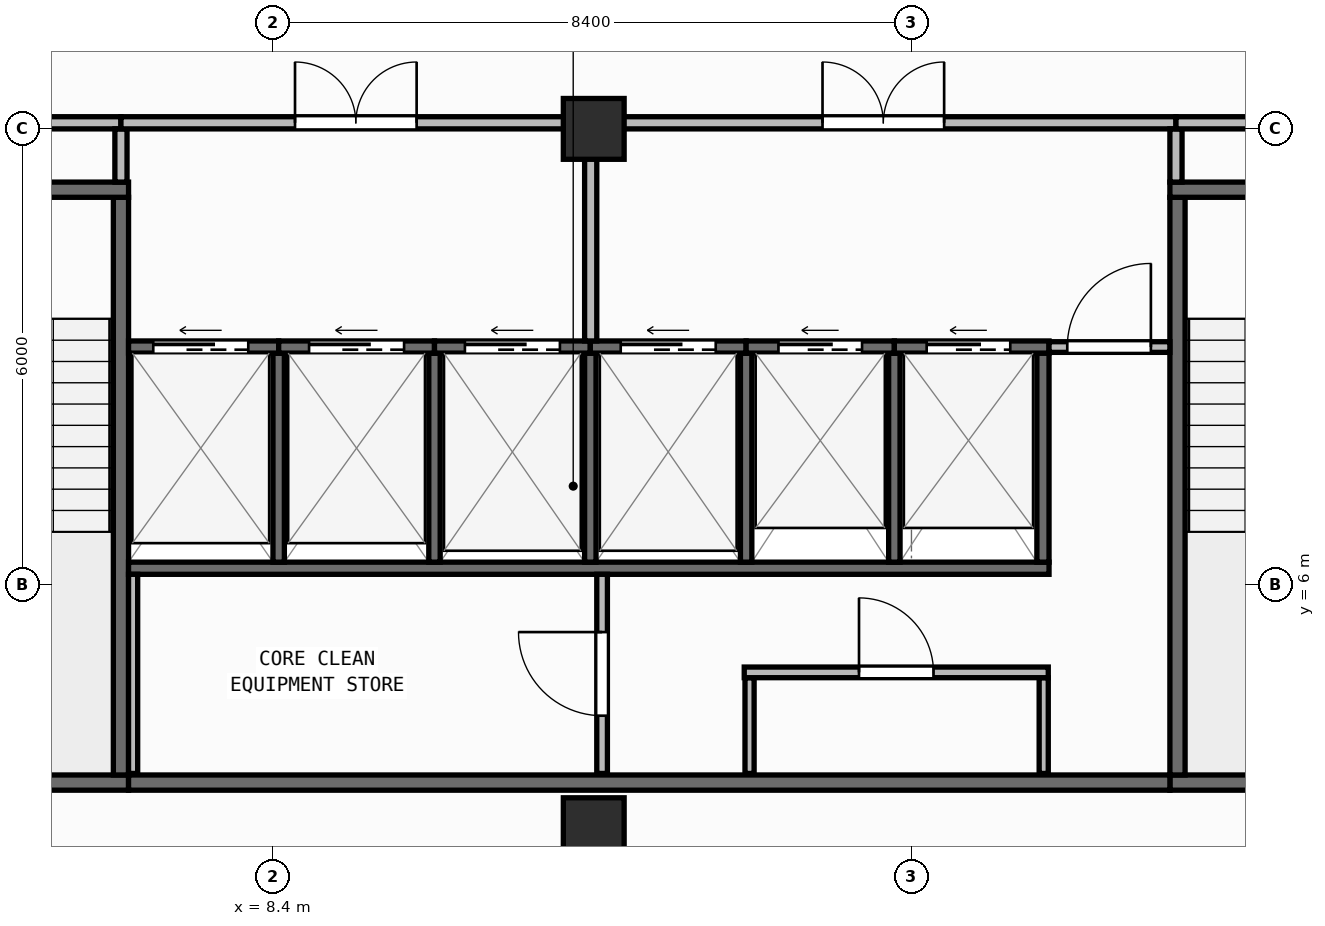
"""IFC4 building model, lengths in metres.
Left out: names, types, materials, properties, quantities, classifications, styles, units other than length and angle.
Written with IfcOpenShell. Run it as: python <this file> out.ifc"""

import sys

from ifc_helpers import new_model, si_unit, direction, frame, frame_2d, origin, origin_2d, place, context, subcontext, project, spatial, rectangle, extrude, element, fill, save


model = new_model("IFC4")
c1 = context("Model", 3, precision=1e-05, world=origin(), true_north=direction((0.0, 1.0)))
c2 = subcontext(c1, "Body", "Model", "MODEL_VIEW")
j1 = project(units=[si_unit("LENGTHUNIT", "METRE"), si_unit("PLANEANGLEUNIT", "RADIAN")], contexts=[c1])
p1 = place(None, origin())
s1 = spatial("IfcSite", under=j1, at=p1, CompositionType="ELEMENT")
p2 = place(p1, origin())
s2 = spatial("IfcBuilding", under=s1, at=p2, CompositionType="ELEMENT")
p3 = place(p2, frame((0.0, 0.0, 244.7)))
s3 = spatial("IfcBuildingStorey", under=s2, at=p3, CompositionType="ELEMENT", Elevation=244.7)
for number, where, z_axis, x_axis in (
    (1, (12.62, 2.8, 0.0), (0.0, 0.0, 1.0), (1.0, 0.0, 0.0)),
    (2, (12.62, 12.0, 0.0), (0.0, 0.0, 1.0), (1.0, 0.0, 0.0)),
):
    element("IfcColumn", number, at=place(p3, frame(where, z_axis=z_axis, x_axis=x_axis)), inside=s3, PredefinedType="COLUMN", context=c2, shape_type="SweptSolid", body=[
        extrude(rectangle(XDim=0.8, YDim=0.8, at=origin_2d()), origin(), (0.0, 0.0, 1.0), 3.95),
    ])
p4 = place(p3, frame((2.66, 0.174, 0.0), z_axis=(0.0, 0.0, 1.0), x_axis=(0.996611813627, 0.082248969229, 0.0)))
e3 = element("IfcWall", 3, at=p4, inside=s3, PredefinedType="STANDARD", context=c2, shape_type="SweptSolid", body=[
    extrude(rectangle(XDim=41.019, YDim=0.26, at=frame_2d((20.51, 0.0))), origin(), (0.0, 0.0, 1.0), 3.71),
])
p5 = place(p4, frame((19.31, 0.0, 0.9)))
e4 = element("IfcOpeningElement", 4, at=p5, cuts=e3, PredefinedType="OPENING", context=c2, shape_type="SweptSolid", body=[
    extrude(rectangle(XDim=2.4, YDim=1.65, at=frame_2d((1.2, 0.825))), frame((0.0, 0.14, 0.0), z_axis=(0.0, -1.0, 0.0), x_axis=(1.0, 0.0, 0.0)), (0.0, 0.0, 1.0), 0.28),
])
p6 = place(p3, frame((2.8, 3.4, 0.0), z_axis=(0.0, 0.0, 1.0), x_axis=(1.0, 0.0, 0.0)))
e5 = element("IfcWall", 5, at=p6, inside=s3, PredefinedType="SHEAR", context=c2, shape_type="SweptSolid", body=[
    extrude(rectangle(XDim=3.7, YDim=0.2, at=frame_2d((1.85, 0.0))), origin(), (0.0, 0.0, 1.0), 3.71),
])
p7 = place(p3, frame((6.4, 3.5, 0.0), z_axis=(0.0, 0.0, 1.0), x_axis=(0.0, 1.0, 0.0)))
e6 = element("IfcWall", 6, at=p7, inside=s3, PredefinedType="SHEAR", context=c2, shape_type="SweptSolid", body=[
    extrude(rectangle(XDim=7.6, YDim=0.2, at=frame_2d((3.8, 0.0))), origin(), (0.0, 0.0, 1.0), 3.71),
])
p8 = place(p3, frame((2.8, 11.2, 0.0), z_axis=(0.0, 0.0, 1.0), x_axis=(1.0, 0.0, 0.0)))
e7 = element("IfcWall", 7, at=p8, inside=s3, PredefinedType="SHEAR", context=c2, shape_type="SweptSolid", body=[
    extrude(rectangle(XDim=3.7, YDim=0.2, at=frame_2d((1.85, 0.0))), origin(), (0.0, 0.0, 1.0), 3.71),
])
p9 = place(p8, frame((1.2, 0.0, 0.0)))
e8 = element("IfcOpeningElement", 8, at=p9, cuts=e7, PredefinedType="OPENING", context=c2, shape_type="SweptSolid", body=[
    extrude(rectangle(XDim=1.3, YDim=2.15, at=frame_2d((0.65, 1.075))), frame((0.0, 0.11, 0.0), z_axis=(0.0, -1.0, 0.0), x_axis=(1.0, 0.0, 0.0)), (0.0, 0.0, 1.0), 0.22),
])
p10 = place(p3, frame((20.2, 3.4, 0.0), z_axis=(0.0, 0.0, 1.0), x_axis=(1.0, 0.0, 0.0)))
e9 = element("IfcWall", 9, at=p10, inside=s3, PredefinedType="SHEAR", context=c2, shape_type="SweptSolid", body=[
    extrude(rectangle(XDim=3.7, YDim=0.2, at=frame_2d((1.85, 0.0))), origin(), (0.0, 0.0, 1.0), 3.71),
])
p11 = place(p3, frame((20.3, 3.5, 0.0), z_axis=(0.0, 0.0, 1.0), x_axis=(0.0, 1.0, 0.0)))
e10 = element("IfcWall", 10, at=p11, inside=s3, PredefinedType="SHEAR", context=c2, shape_type="SweptSolid", body=[
    extrude(rectangle(XDim=7.6, YDim=0.2, at=frame_2d((3.8, 0.0))), origin(), (0.0, 0.0, 1.0), 3.71),
])
p12 = place(p3, frame((20.2, 11.2, 0.0), z_axis=(0.0, 0.0, 1.0), x_axis=(1.0, 0.0, 0.0)))
e11 = element("IfcWall", 11, at=p12, inside=s3, PredefinedType="SHEAR", context=c2, shape_type="SweptSolid", body=[
    extrude(rectangle(XDim=3.7, YDim=0.2, at=frame_2d((1.85, 0.0))), origin(), (0.0, 0.0, 1.0), 3.71),
])
p13 = place(p12, frame((1.2, 0.0, 0.0)))
e12 = element("IfcOpeningElement", 12, at=p13, cuts=e11, PredefinedType="OPENING", context=c2, shape_type="SweptSolid", body=[
    extrude(rectangle(XDim=1.3, YDim=2.15, at=frame_2d((0.65, 1.075))), frame((0.0, 0.11, 0.0), z_axis=(0.0, -1.0, 0.0), x_axis=(1.0, 0.0, 0.0)), (0.0, 0.0, 1.0), 0.22),
])
p14 = place(p3, frame((6.5, 3.4, 0.0), z_axis=(0.0, 0.0, 1.0), x_axis=(1.0, 0.0, 0.0)))
e13 = element("IfcWall", 13, at=p14, inside=s3, PredefinedType="SHEAR", context=c2, shape_type="SweptSolid", body=[
    extrude(rectangle(XDim=13.7, YDim=0.2, at=frame_2d((6.85, 0.0))), origin(), (0.0, 0.0, 1.0), 3.71),
])
p15 = place(p3, frame((6.5, 6.22, 0.0), z_axis=(0.0, 0.0, 1.0), x_axis=(1.0, 0.0, 0.0)))
e14 = element("IfcWall", 14, at=p15, inside=s3, PredefinedType="SHEAR", context=c2, shape_type="SweptSolid", body=[
    extrude(rectangle(XDim=12.11, YDim=0.16, at=frame_2d((6.055, 0.0))), origin(), (0.0, 0.0, 1.0), 3.71),
])
p16 = place(p3, frame((18.53, 6.3, 0.0), z_axis=(0.0, 0.0, 1.0), x_axis=(0.0, 1.0, 0.0)))
e15 = element("IfcWall", 15, at=p16, inside=s3, PredefinedType="SHEAR", context=c2, shape_type="SweptSolid", body=[
    extrude(rectangle(XDim=2.75, YDim=0.16, at=frame_2d((1.375, 0.0))), origin(), (0.0, 0.0, 1.0), 3.71),
])
for number, where, z_axis, x_axis in (
    (16, (8.475, 6.3, 0.0), (0.0, 0.0, 1.0), (0.0, 1.0, 0.0)),
    (17, (10.525, 6.3, 0.0), (0.0, 0.0, 1.0), (0.0, 1.0, 0.0)),
    (18, (12.575, 6.3, 0.0), (0.0, 0.0, 1.0), (0.0, 1.0, 0.0)),
    (19, (14.625, 6.3, 0.0), (0.0, 0.0, 1.0), (0.0, 1.0, 0.0)),
    (20, (16.575, 6.3, 0.0), (0.0, 0.0, 1.0), (0.0, 1.0, 0.0)),
):
    element("IfcWall", number, at=place(p3, frame(where, z_axis=z_axis, x_axis=x_axis)), inside=s3, PredefinedType="SHEAR", context=c2, shape_type="SweptSolid", body=[
        extrude(rectangle(XDim=2.75, YDim=0.15, at=frame_2d((1.375, 0.0))), origin(), (0.0, 0.0, 1.0), 3.71),
    ])
p17 = place(p3, frame((6.5, 9.13, 0.0), z_axis=(0.0, 0.0, 1.0), x_axis=(1.0, 0.0, 0.0)))
e21 = element("IfcWall", 21, at=p17, inside=s3, PredefinedType="SHEAR", context=c2, shape_type="SweptSolid", body=[
    extrude(rectangle(XDim=1.975, YDim=0.16, at=frame_2d((0.988, 0.0))), origin(), (0.0, 0.0, 1.0), 3.71),
])
p18 = place(p17, frame((0.325, 0.0, 0.0)))
e22 = element("IfcOpeningElement", 22, at=p18, cuts=e21, PredefinedType="OPENING", context=c2, shape_type="SweptSolid", body=[
    extrude(rectangle(XDim=1.25, YDim=2.15, at=frame_2d((0.625, 1.075))), frame((0.0, 0.09, 0.0), z_axis=(0.0, -1.0, 0.0), x_axis=(1.0, 0.0, 0.0)), (0.0, 0.0, 1.0), 0.18),
])
p19 = place(p3, frame((8.475, 9.13, 0.0), z_axis=(0.0, 0.0, 1.0), x_axis=(1.0, 0.0, 0.0)))
e23 = element("IfcWall", 23, at=p19, inside=s3, PredefinedType="SHEAR", context=c2, shape_type="SweptSolid", body=[
    extrude(rectangle(XDim=2.05, YDim=0.16, at=frame_2d((1.025, 0.0))), origin(), (0.0, 0.0, 1.0), 3.71),
])
p20 = place(p19, frame((0.4, 0.0, 0.0)))
e24 = element("IfcOpeningElement", 24, at=p20, cuts=e23, PredefinedType="OPENING", context=c2, shape_type="SweptSolid", body=[
    extrude(rectangle(XDim=1.25, YDim=2.15, at=frame_2d((0.625, 1.075))), frame((0.0, 0.09, 0.0), z_axis=(0.0, -1.0, 0.0), x_axis=(1.0, 0.0, 0.0)), (0.0, 0.0, 1.0), 0.18),
])
p21 = place(p3, frame((10.525, 9.13, 0.0), z_axis=(0.0, 0.0, 1.0), x_axis=(1.0, 0.0, 0.0)))
e25 = element("IfcWall", 25, at=p21, inside=s3, PredefinedType="SHEAR", context=c2, shape_type="SweptSolid", body=[
    extrude(rectangle(XDim=2.05, YDim=0.16, at=frame_2d((1.025, 0.0))), origin(), (0.0, 0.0, 1.0), 3.71),
])
p22 = place(p21, frame((0.4, 0.0, 0.0)))
e26 = element("IfcOpeningElement", 26, at=p22, cuts=e25, PredefinedType="OPENING", context=c2, shape_type="SweptSolid", body=[
    extrude(rectangle(XDim=1.25, YDim=2.15, at=frame_2d((0.625, 1.075))), frame((0.0, 0.09, 0.0), z_axis=(0.0, -1.0, 0.0), x_axis=(1.0, 0.0, 0.0)), (0.0, 0.0, 1.0), 0.18),
])
p23 = place(p3, frame((12.575, 9.13, 0.0), z_axis=(0.0, 0.0, 1.0), x_axis=(1.0, 0.0, 0.0)))
e27 = element("IfcWall", 27, at=p23, inside=s3, PredefinedType="SHEAR", context=c2, shape_type="SweptSolid", body=[
    extrude(rectangle(XDim=2.05, YDim=0.16, at=frame_2d((1.025, 0.0))), origin(), (0.0, 0.0, 1.0), 3.71),
])
p24 = place(p23, frame((0.4, 0.0, 0.0)))
e28 = element("IfcOpeningElement", 28, at=p24, cuts=e27, PredefinedType="OPENING", context=c2, shape_type="SweptSolid", body=[
    extrude(rectangle(XDim=1.25, YDim=2.15, at=frame_2d((0.625, 1.075))), frame((0.0, 0.09, 0.0), z_axis=(0.0, -1.0, 0.0), x_axis=(1.0, 0.0, 0.0)), (0.0, 0.0, 1.0), 0.18),
])
p25 = place(p3, frame((14.625, 9.13, 0.0), z_axis=(0.0, 0.0, 1.0), x_axis=(1.0, 0.0, 0.0)))
e29 = element("IfcWall", 29, at=p25, inside=s3, PredefinedType="SHEAR", context=c2, shape_type="SweptSolid", body=[
    extrude(rectangle(XDim=1.95, YDim=0.16, at=frame_2d((0.975, 0.0))), origin(), (0.0, 0.0, 1.0), 3.71),
])
p26 = place(p25, frame((0.425, 0.0, 0.0)))
e30 = element("IfcOpeningElement", 30, at=p26, cuts=e29, PredefinedType="OPENING", context=c2, shape_type="SweptSolid", body=[
    extrude(rectangle(XDim=1.1, YDim=2.15, at=frame_2d((0.55, 1.075))), frame((0.0, 0.09, 0.0), z_axis=(0.0, -1.0, 0.0), x_axis=(1.0, 0.0, 0.0)), (0.0, 0.0, 1.0), 0.18),
])
p27 = place(p3, frame((16.575, 9.13, 0.0), z_axis=(0.0, 0.0, 1.0), x_axis=(1.0, 0.0, 0.0)))
e31 = element("IfcWall", 31, at=p27, inside=s3, PredefinedType="SHEAR", context=c2, shape_type="SweptSolid", body=[
    extrude(rectangle(XDim=2.035, YDim=0.16, at=frame_2d((1.018, 0.0))), origin(), (0.0, 0.0, 1.0), 3.71),
])
p28 = place(p27, frame((0.425, 0.0, 0.0)))
e32 = element("IfcOpeningElement", 32, at=p28, cuts=e31, PredefinedType="OPENING", context=c2, shape_type="SweptSolid", body=[
    extrude(rectangle(XDim=1.1, YDim=2.15, at=frame_2d((0.55, 1.075))), frame((0.0, 0.09, 0.0), z_axis=(0.0, -1.0, 0.0), x_axis=(1.0, 0.0, 0.0)), (0.0, 0.0, 1.0), 0.18),
])
p29 = place(p3, frame((6.56, 3.52, 0.0), z_axis=(0.0, 0.0, 1.0), x_axis=(0.0, 1.0, 0.0)))
e33 = element("IfcWall", 33, at=p29, inside=s3, PredefinedType="PARTITIONING", context=c2, shape_type="SweptSolid", body=[
    extrude(rectangle(XDim=2.62, YDim=0.12, at=frame_2d((1.31, 0.0))), origin(), (0.0, 0.0, 1.0), 3.71),
])
p30 = place(p3, frame((12.73, 3.52, 0.0), z_axis=(0.0, 0.0, 1.0), x_axis=(0.0, 1.0, 0.0)))
e34 = element("IfcWall", 34, at=p30, inside=s3, PredefinedType="PARTITIONING", context=c2, shape_type="SweptSolid", body=[
    extrude(rectangle(XDim=2.62, YDim=0.14, at=frame_2d((1.31, 0.0))), origin(), (0.0, 0.0, 1.0), 3.71),
])
p31 = place(p30, frame((0.76, 0.0, 0.0)))
e35 = element("IfcOpeningElement", 35, at=p31, cuts=e34, PredefinedType="OPENING", context=c2, shape_type="SweptSolid", body=[
    extrude(rectangle(XDim=1.1, YDim=2.1, at=frame_2d((0.55, 1.05))), frame((0.0, 0.08, 0.0), z_axis=(0.0, -1.0, 0.0), x_axis=(1.0, 0.0, 0.0)), (0.0, 0.0, 1.0), 0.16),
])
for number, where, z_axis, x_axis in (
    (36, (14.67, 3.52, 0.0), (0.0, 0.0, 1.0), (0.0, 1.0, 0.0)),
    (37, (18.54, 3.52, 0.0), (0.0, 0.0, 1.0), (0.0, 1.0, 0.0)),
):
    element("IfcWall", number, at=place(p3, frame(where, z_axis=z_axis, x_axis=x_axis)), inside=s3, PredefinedType="PARTITIONING", context=c2, shape_type="SweptSolid", body=[
        extrude(rectangle(XDim=1.26, YDim=0.12, at=frame_2d((0.63, 0.0))), origin(), (0.0, 0.0, 1.0), 3.71),
    ])
p32 = place(p3, frame((14.6, 4.85, 0.0), z_axis=(0.0, 0.0, 1.0), x_axis=(1.0, 0.0, 0.0)))
e38 = element("IfcWall", 38, at=p32, inside=s3, PredefinedType="PARTITIONING", context=c2, shape_type="SweptSolid", body=[
    extrude(rectangle(XDim=4.0, YDim=0.14, at=frame_2d((2.0, 0.0))), origin(), (0.0, 0.0, 1.0), 3.71),
])
p33 = place(p32, frame((1.51, 0.0, 0.0)))
e39 = element("IfcOpeningElement", 39, at=p33, cuts=e38, PredefinedType="OPENING", context=c2, shape_type="SweptSolid", body=[
    extrude(rectangle(XDim=0.98, YDim=2.1, at=frame_2d((0.49, 1.05))), frame((0.0, 0.08, 0.0), z_axis=(0.0, -1.0, 0.0), x_axis=(1.0, 0.0, 0.0)), (0.0, 0.0, 1.0), 0.16),
])
p34 = place(p3, frame((18.61, 9.13, 0.0), z_axis=(0.0, 0.0, 1.0), x_axis=(1.0, 0.0, 0.0)))
e40 = element("IfcWall", 40, at=p34, inside=s3, PredefinedType="PARTITIONING", context=c2, shape_type="SweptSolid", body=[
    extrude(rectangle(XDim=1.59, YDim=0.14, at=frame_2d((0.795, 0.0))), origin(), (0.0, 0.0, 1.0), 3.71),
])
p35 = place(p34, frame((0.24, 0.0, 0.0)))
e41 = element("IfcOpeningElement", 41, at=p35, cuts=e40, PredefinedType="OPENING", context=c2, shape_type="SweptSolid", body=[
    extrude(rectangle(XDim=1.1, YDim=2.1, at=frame_2d((0.55, 1.05))), frame((0.0, 0.08, 0.0), z_axis=(0.0, -1.0, 0.0), x_axis=(1.0, 0.0, 0.0)), (0.0, 0.0, 1.0), 0.16),
])
p36 = place(p3, frame((2.8, 12.08, 0.0), z_axis=(0.0, 0.0, 1.0), x_axis=(1.0, 0.0, 0.0)))
e42 = element("IfcWall", 42, at=p36, inside=s3, PredefinedType="PARTITIONING", context=c2, shape_type="SweptSolid", body=[
    extrude(rectangle(XDim=3.6, YDim=0.16, at=frame_2d((1.8, 0.0))), origin(), (0.0, 0.0, 1.0), 3.157),
])
p37 = place(p36, frame((1.0, 0.0, 0.0)))
e43 = element("IfcOpeningElement", 43, at=p37, cuts=e42, PredefinedType="OPENING", context=c2, shape_type="SweptSolid", body=[
    extrude(rectangle(XDim=1.6, YDim=2.05, at=frame_2d((0.8, 1.025))), frame((0.0, 0.09, 0.0), z_axis=(0.0, -1.0, 0.0), x_axis=(1.0, 0.0, 0.0)), (0.0, 0.0, 1.0), 0.18),
])
p38 = place(p3, frame((6.4, 11.3, 0.0), z_axis=(0.0, 0.0, 1.0), x_axis=(0.0, 1.0, 0.0)))
e44 = element("IfcWall", 44, at=p38, inside=s3, PredefinedType="PARTITIONING", context=c2, shape_type="SweptSolid", body=[
    extrude(rectangle(XDim=0.7, YDim=0.16, at=frame_2d((0.35, 0.0))), origin(), (0.0, 0.0, 1.0), 3.71),
])
p39 = place(p3, frame((6.4, 12.08, 0.0), z_axis=(0.0, 0.0, 1.0), x_axis=(1.0, 0.0, 0.0)))
e45 = element("IfcWall", 45, at=p39, inside=s3, PredefinedType="PARTITIONING", context=c2, shape_type="SweptSolid", body=[
    extrude(rectangle(XDim=6.18, YDim=0.16, at=frame_2d((3.09, 0.0))), origin(), (0.0, 0.0, 1.0), 3.157),
])
p40 = place(p39, frame((2.29, 0.0, 0.0)))
e46 = element("IfcOpeningElement", 46, at=p40, cuts=e45, PredefinedType="OPENING", context=c2, shape_type="SweptSolid", body=[
    extrude(rectangle(XDim=1.6, YDim=2.05, at=frame_2d((0.8, 1.025))), frame((0.0, 0.09, 0.0), z_axis=(0.0, -1.0, 0.0), x_axis=(1.0, 0.0, 0.0)), (0.0, 0.0, 1.0), 0.18),
])
p41 = place(p3, frame((12.58, 9.21, 0.0), z_axis=(0.0, 0.0, 1.0), x_axis=(0.0, 1.0, 0.0)))
e47 = element("IfcWall", 47, at=p41, inside=s3, PredefinedType="PARTITIONING", context=c2, shape_type="SweptSolid", body=[
    extrude(rectangle(XDim=2.79, YDim=0.16, at=frame_2d((1.395, 0.0))), origin(), (0.0, 0.0, 1.0), 3.71),
])
p42 = place(p3, frame((12.58, 12.08, 0.0), z_axis=(0.0, 0.0, 1.0), x_axis=(1.0, 0.0, 0.0)))
e48 = element("IfcWall", 48, at=p42, inside=s3, PredefinedType="PARTITIONING", context=c2, shape_type="SweptSolid", body=[
    extrude(rectangle(XDim=7.7, YDim=0.16, at=frame_2d((3.85, 0.0))), origin(), (0.0, 0.0, 1.0), 3.157),
])
p43 = place(p42, frame((3.05, 0.0, 0.0)))
e49 = element("IfcOpeningElement", 49, at=p43, cuts=e48, PredefinedType="OPENING", context=c2, shape_type="SweptSolid", body=[
    extrude(rectangle(XDim=1.6, YDim=2.05, at=frame_2d((0.8, 1.025))), frame((0.0, 0.09, 0.0), z_axis=(0.0, -1.0, 0.0), x_axis=(1.0, 0.0, 0.0)), (0.0, 0.0, 1.0), 0.18),
])
p44 = place(p3, frame((20.28, 11.3, 0.0), z_axis=(0.0, 0.0, 1.0), x_axis=(0.0, 1.0, 0.0)))
e50 = element("IfcWall", 50, at=p44, inside=s3, PredefinedType="PARTITIONING", context=c2, shape_type="SweptSolid", body=[
    extrude(rectangle(XDim=0.7, YDim=0.16, at=frame_2d((0.35, 0.0))), origin(), (0.0, 0.0, 1.0), 3.71),
])
p45 = place(p3, frame((20.28, 12.08, 0.0), z_axis=(0.0, 0.0, 1.0), x_axis=(1.0, 0.0, 0.0)))
e51 = element("IfcWall", 51, at=p45, inside=s3, PredefinedType="PARTITIONING", context=c2, shape_type="SweptSolid", body=[
    extrude(rectangle(XDim=3.62, YDim=0.16, at=frame_2d((1.81, 0.0))), origin(), (0.0, 0.0, 1.0), 3.157),
])
p46 = place(p45, frame((1.01, 0.0, 0.0)))
e52 = element("IfcOpeningElement", 52, at=p46, cuts=e51, PredefinedType="OPENING", context=c2, shape_type="SweptSolid", body=[
    extrude(rectangle(XDim=1.6, YDim=2.05, at=frame_2d((0.8, 1.025))), frame((0.0, 0.09, 0.0), z_axis=(0.0, -1.0, 0.0), x_axis=(1.0, 0.0, 0.0)), (0.0, 0.0, 1.0), 0.18),
])
p47 = place(p18, origin())
e53 = element("IfcDoor", 53, at=p47, inside=s3, OperationType="SLIDING_TO_LEFT", PredefinedType="DOOR", context=c2, shape_type="SweptSolid", body=[
    extrude(rectangle(XDim=1.25, YDim=2.15, at=frame_2d((0.625, 1.075))), frame((0.0, 0.025, 0.0), z_axis=(0.0, -1.0, 0.0), x_axis=(1.0, 0.0, 0.0)), (0.0, 0.0, 1.0), 0.05),
])
fill(e22, e53)
p48 = place(p20, origin())
e54 = element("IfcDoor", 54, at=p48, inside=s3, OperationType="SLIDING_TO_LEFT", PredefinedType="DOOR", context=c2, shape_type="SweptSolid", body=[
    extrude(rectangle(XDim=1.25, YDim=2.15, at=frame_2d((0.625, 1.075))), frame((0.0, 0.025, 0.0), z_axis=(0.0, -1.0, 0.0), x_axis=(1.0, 0.0, 0.0)), (0.0, 0.0, 1.0), 0.05),
])
fill(e24, e54)
p49 = place(p22, origin())
e55 = element("IfcDoor", 55, at=p49, inside=s3, OperationType="SLIDING_TO_LEFT", PredefinedType="DOOR", context=c2, shape_type="SweptSolid", body=[
    extrude(rectangle(XDim=1.25, YDim=2.15, at=frame_2d((0.625, 1.075))), frame((0.0, 0.025, 0.0), z_axis=(0.0, -1.0, 0.0), x_axis=(1.0, 0.0, 0.0)), (0.0, 0.0, 1.0), 0.05),
])
fill(e26, e55)
p50 = place(p24, origin())
e56 = element("IfcDoor", 56, at=p50, inside=s3, OperationType="SLIDING_TO_LEFT", PredefinedType="DOOR", context=c2, shape_type="SweptSolid", body=[
    extrude(rectangle(XDim=1.25, YDim=2.15, at=frame_2d((0.625, 1.075))), frame((0.0, 0.025, 0.0), z_axis=(0.0, -1.0, 0.0), x_axis=(1.0, 0.0, 0.0)), (0.0, 0.0, 1.0), 0.05),
])
fill(e28, e56)
p51 = place(p26, origin())
e57 = element("IfcDoor", 57, at=p51, inside=s3, OperationType="SLIDING_TO_LEFT", PredefinedType="DOOR", context=c2, shape_type="SweptSolid", body=[
    extrude(rectangle(XDim=1.1, YDim=2.15, at=frame_2d((0.55, 1.075))), frame((0.0, 0.025, 0.0), z_axis=(0.0, -1.0, 0.0), x_axis=(1.0, 0.0, 0.0)), (0.0, 0.0, 1.0), 0.05),
])
fill(e30, e57)
p52 = place(p28, origin())
e58 = element("IfcDoor", 58, at=p52, inside=s3, OperationType="SLIDING_TO_LEFT", PredefinedType="DOOR", context=c2, shape_type="SweptSolid", body=[
    extrude(rectangle(XDim=1.1, YDim=2.15, at=frame_2d((0.55, 1.075))), frame((0.0, 0.025, 0.0), z_axis=(0.0, -1.0, 0.0), x_axis=(1.0, 0.0, 0.0)), (0.0, 0.0, 1.0), 0.05),
])
fill(e32, e58)
p53 = place(p31, origin())
e59 = element("IfcDoor", 59, at=p53, inside=s3, OperationType="SINGLE_SWING_RIGHT", PredefinedType="DOOR", context=c2, shape_type="SweptSolid", body=[
    extrude(rectangle(XDim=1.1, YDim=2.1, at=frame_2d((0.55, 1.05))), frame((0.0, 0.025, 0.0), z_axis=(0.0, -1.0, 0.0), x_axis=(1.0, 0.0, 0.0)), (0.0, 0.0, 1.0), 0.05),
])
fill(e35, e59)
p54 = place(p33, origin())
e60 = element("IfcDoor", 60, at=p54, inside=s3, OperationType="SINGLE_SWING_LEFT", PredefinedType="DOOR", context=c2, shape_type="SweptSolid", body=[
    extrude(rectangle(XDim=0.98, YDim=2.1, at=frame_2d((0.49, 1.05))), frame((0.0, 0.025, 0.0), z_axis=(0.0, -1.0, 0.0), x_axis=(1.0, 0.0, 0.0)), (0.0, 0.0, 1.0), 0.05),
])
fill(e39, e60)
p55 = place(p35, origin())
e61 = element("IfcDoor", 61, at=p55, inside=s3, OperationType="SINGLE_SWING_RIGHT", PredefinedType="DOOR", context=c2, shape_type="SweptSolid", body=[
    extrude(rectangle(XDim=1.1, YDim=2.1, at=frame_2d((0.55, 1.05))), frame((0.0, 0.025, 0.0), z_axis=(0.0, -1.0, 0.0), x_axis=(1.0, 0.0, 0.0)), (0.0, 0.0, 1.0), 0.05),
])
fill(e41, e61)
p56 = place(p40, origin())
e62 = element("IfcDoor", 62, at=p56, inside=s3, OperationType="DOUBLE_DOOR_SINGLE_SWING", PredefinedType="DOOR", context=c2, shape_type="SweptSolid", body=[
    extrude(rectangle(XDim=1.6, YDim=2.05, at=frame_2d((0.8, 1.025))), frame((0.0, 0.025, 0.0), z_axis=(0.0, -1.0, 0.0), x_axis=(1.0, 0.0, 0.0)), (0.0, 0.0, 1.0), 0.05),
])
fill(e46, e62)
p57 = place(p43, origin())
e63 = element("IfcDoor", 63, at=p57, inside=s3, OperationType="DOUBLE_DOOR_SINGLE_SWING", PredefinedType="DOOR", context=c2, shape_type="SweptSolid", body=[
    extrude(rectangle(XDim=1.6, YDim=2.05, at=frame_2d((0.8, 1.025))), frame((0.0, 0.025, 0.0), z_axis=(0.0, -1.0, 0.0), x_axis=(1.0, 0.0, 0.0)), (0.0, 0.0, 1.0), 0.05),
])
fill(e49, e63)
save(model, sys.argv[1])
